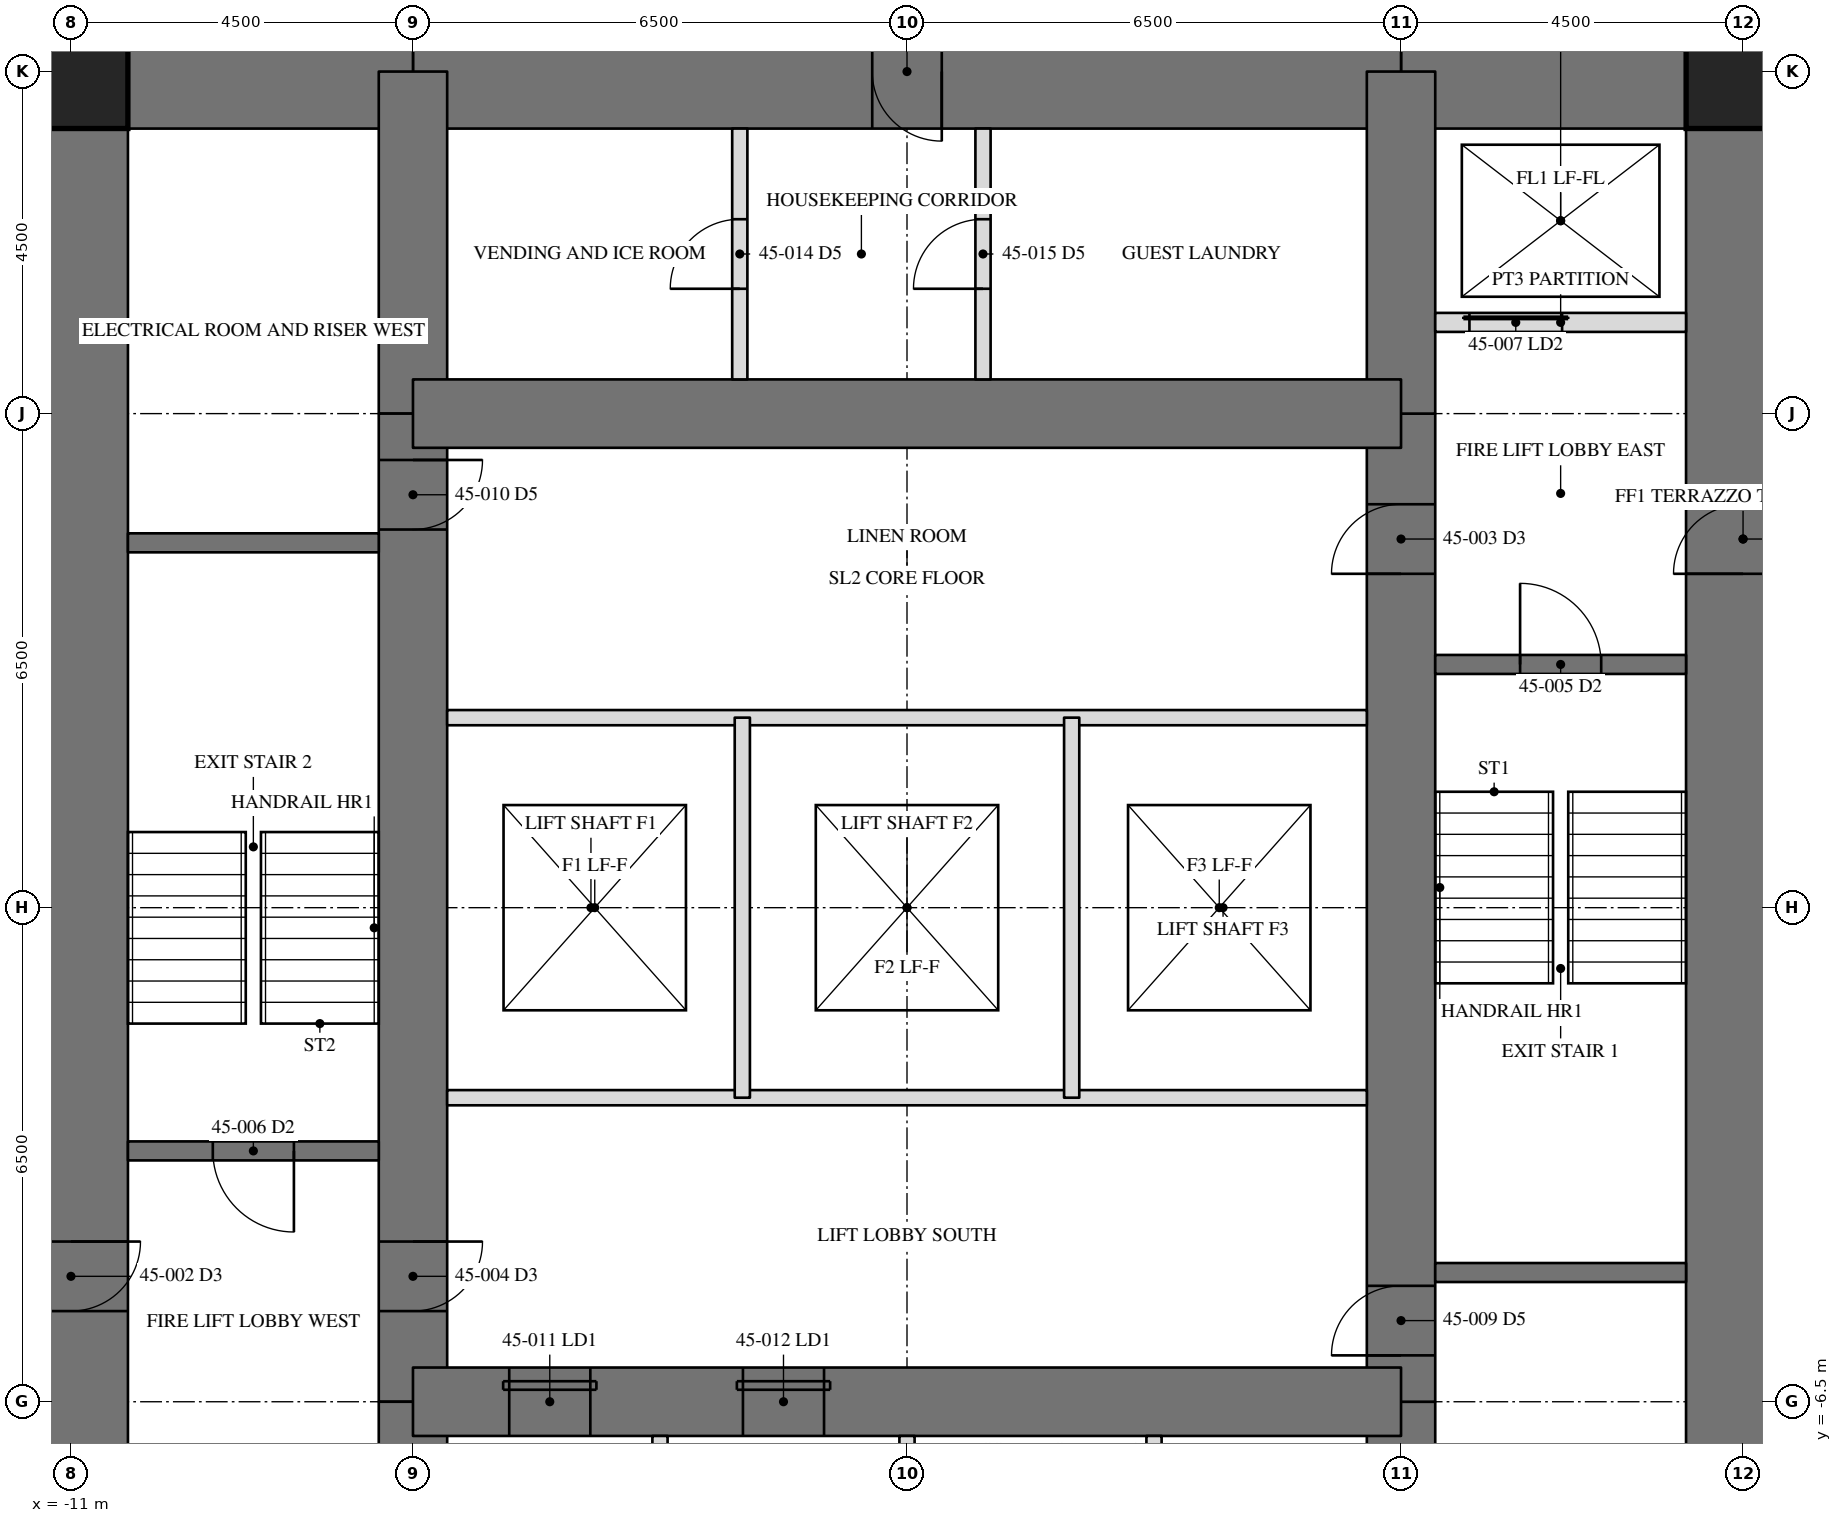
"""IFC4 building model, lengths in metres.
Left out: names, types, materials, properties, quantities, classifications, styles, units other than length and angle.
Written with IfcOpenShell. Run it as: python <this file> out.ifc"""

import sys

from ifc_helpers import new_model, si_unit, direction, frame, frame_2d, origin, origin_2d, place, context, subcontext, project, spatial, rectangle, hollow_rectangle, extrude, element, fill, save


model = new_model("IFC4")
c1 = context("Model", 3, precision=1e-05, world=origin(), true_north=direction((0.0, 1.0)))
c2 = subcontext(c1, "Body", "Model", "MODEL_VIEW")
j1 = project(units=[si_unit("LENGTHUNIT", "METRE"), si_unit("PLANEANGLEUNIT", "RADIAN")], contexts=[c1])
p1 = place(None, origin())
s1 = spatial("IfcSite", under=j1, at=p1, CompositionType="ELEMENT")
p2 = place(p1, origin())
s2 = spatial("IfcBuilding", under=s1, at=p2, CompositionType="ELEMENT")
p3 = place(p2, frame((0.0, 0.0, 194.2)))
s3 = spatial("IfcBuildingStorey", under=s2, at=p3, CompositionType="ELEMENT", Elevation=194.2)
p4 = place(p3, frame((11.0, -11.0, 0.0), z_axis=(0.0, 0.0, 1.0), x_axis=(0.0, 1.0, 0.0)))
e1 = element("IfcWall", 1, at=p4, inside=s3, PredefinedType="SHEAR", context=c2, shape_type="SweptSolid", body=[
    extrude(rectangle(XDim=22.0, YDim=1.5, at=frame_2d((11.0, 0.0))), origin(), (0.0, 0.0, 1.0), 3.5),
])
p5 = place(p4, frame((15.393, 0.0, 0.0)))
e2 = element("IfcOpeningElement", 2, at=p5, cuts=e1, PredefinedType="OPENING", context=c2, shape_type="SweptSolid", body=[
    extrude(rectangle(XDim=0.915, YDim=2.134, at=frame_2d((0.458, 1.067))), frame((0.0, 0.76, 0.0), z_axis=(0.0, -1.0, 0.0), x_axis=(1.0, 0.0, 0.0)), (0.0, 0.0, 1.0), 1.52),
])
p6 = place(p3, frame((-11.0, 11.0, 0.0), z_axis=(0.0, 0.0, 1.0), x_axis=(0.0, -1.0, 0.0)))
e3 = element("IfcWall", 3, at=p6, inside=s3, PredefinedType="SHEAR", context=c2, shape_type="SweptSolid", body=[
    extrude(rectangle(XDim=22.0, YDim=1.5, at=frame_2d((11.0, 0.0))), origin(), (0.0, 0.0, 1.0), 3.5),
])
p7 = place(p6, frame((15.393, 0.0, 0.0)))
e4 = element("IfcOpeningElement", 4, at=p7, cuts=e3, PredefinedType="OPENING", context=c2, shape_type="SweptSolid", body=[
    extrude(rectangle(XDim=0.915, YDim=2.134, at=frame_2d((0.458, 1.067))), frame((0.0, 0.76, 0.0), z_axis=(0.0, -1.0, 0.0), x_axis=(1.0, 0.0, 0.0)), (0.0, 0.0, 1.0), 1.52),
])
p8 = place(p3, frame((11.0, 11.0, 0.0), z_axis=(0.0, 0.0, 1.0), x_axis=(-1.0, 0.0, 0.0)))
e5 = element("IfcWall", 5, at=p8, inside=s3, PredefinedType="SHEAR", context=c2, shape_type="SweptSolid", body=[
    extrude(rectangle(XDim=4.5, YDim=1.5, at=frame_2d((2.25, 0.0))), origin(), (0.0, 0.0, 1.0), 3.5),
])
p9 = place(p3, frame((6.5, 11.0, 0.0), z_axis=(0.0, 0.0, 1.0), x_axis=(-1.0, 0.0, 0.0)))
e6 = element("IfcWall", 6, at=p9, inside=s3, PredefinedType="SHEAR", context=c2, shape_type="SweptSolid", body=[
    extrude(rectangle(XDim=13.0, YDim=1.5, at=frame_2d((6.5, 0.0))), origin(), (0.0, 0.0, 1.0), 3.5),
])
p10 = place(p9, frame((6.042, 0.0, 0.0)))
e7 = element("IfcOpeningElement", 7, at=p10, cuts=e6, PredefinedType="OPENING", context=c2, shape_type="SweptSolid", body=[
    extrude(rectangle(XDim=0.915, YDim=2.134, at=frame_2d((0.458, 1.067))), frame((0.0, 0.76, 0.0), z_axis=(0.0, -1.0, 0.0), x_axis=(1.0, 0.0, 0.0)), (0.0, 0.0, 1.0), 1.52),
])
p11 = place(p3, frame((-6.5, 11.0, 0.0), z_axis=(0.0, 0.0, 1.0), x_axis=(-1.0, 0.0, 0.0)))
e8 = element("IfcWall", 8, at=p11, inside=s3, PredefinedType="SHEAR", context=c2, shape_type="SweptSolid", body=[
    extrude(rectangle(XDim=4.5, YDim=1.5, at=frame_2d((2.25, 0.0))), origin(), (0.0, 0.0, 1.0), 3.5),
])
p12 = place(p3, frame((6.5, -11.0, 0.0), z_axis=(0.0, 0.0, 1.0), x_axis=(0.0, 1.0, 0.0)))
e9 = element("IfcWall", 9, at=p12, inside=s3, PredefinedType="SHEAR", context=c2, shape_type="SweptSolid", body=[
    extrude(rectangle(XDim=4.5, YDim=0.9, at=frame_2d((2.25, 0.0))), origin(), (0.0, 0.0, 1.0), 3.5),
])
p13 = place(p3, frame((6.5, -6.5, 0.0), z_axis=(0.0, 0.0, 1.0), x_axis=(0.0, 1.0, 0.0)))
e10 = element("IfcWall", 10, at=p13, inside=s3, PredefinedType="SHEAR", context=c2, shape_type="SweptSolid", body=[
    extrude(rectangle(XDim=13.0, YDim=0.9, at=frame_2d((6.5, 0.0))), origin(), (0.0, 0.0, 1.0), 3.5),
])
p14 = place(p13, frame((10.893, 0.0, 0.0)))
e11 = element("IfcOpeningElement", 11, at=p14, cuts=e10, PredefinedType="OPENING", context=c2, shape_type="SweptSolid", body=[
    extrude(rectangle(XDim=0.915, YDim=2.134, at=frame_2d((0.458, 1.067))), frame((0.0, 0.46, 0.0), z_axis=(0.0, -1.0, 0.0), x_axis=(1.0, 0.0, 0.0)), (0.0, 0.0, 1.0), 0.92),
])
p15 = place(p13, frame((0.61, 0.0, 0.0)))
e12 = element("IfcOpeningElement", 12, at=p15, cuts=e10, PredefinedType="OPENING", context=c2, shape_type="SweptSolid", body=[
    extrude(rectangle(XDim=0.915, YDim=2.134, at=frame_2d((0.458, 1.067))), frame((0.0, 0.46, 0.0), z_axis=(0.0, -1.0, 0.0), x_axis=(1.0, 0.0, 0.0)), (0.0, 0.0, 1.0), 0.92),
])
for number, where, z_axis, x_axis in (
    (13, (6.5, 6.5, 0.0), (0.0, 0.0, 1.0), (0.0, 1.0, 0.0)),
    (14, (-6.5, 11.0, 0.0), (0.0, 0.0, 1.0), (0.0, -1.0, 0.0)),
):
    element("IfcWall", number, at=place(p3, frame(where, z_axis=z_axis, x_axis=x_axis)), inside=s3, PredefinedType="SHEAR", context=c2, shape_type="SweptSolid", body=[
        extrude(rectangle(XDim=4.5, YDim=0.9, at=frame_2d((2.25, 0.0))), origin(), (0.0, 0.0, 1.0), 3.5),
    ])
p16 = place(p3, frame((-6.5, 6.5, 0.0), z_axis=(0.0, 0.0, 1.0), x_axis=(0.0, -1.0, 0.0)))
e15 = element("IfcWall", 15, at=p16, inside=s3, PredefinedType="SHEAR", context=c2, shape_type="SweptSolid", body=[
    extrude(rectangle(XDim=13.0, YDim=0.9, at=frame_2d((6.5, 0.0))), origin(), (0.0, 0.0, 1.0), 3.5),
])
p17 = place(p16, frame((10.893, 0.0, 0.0)))
e16 = element("IfcOpeningElement", 16, at=p17, cuts=e15, PredefinedType="OPENING", context=c2, shape_type="SweptSolid", body=[
    extrude(rectangle(XDim=0.915, YDim=2.134, at=frame_2d((0.458, 1.067))), frame((0.0, 0.46, 0.0), z_axis=(0.0, -1.0, 0.0), x_axis=(1.0, 0.0, 0.0)), (0.0, 0.0, 1.0), 0.92),
])
p18 = place(p16, frame((0.61, 0.0, 0.0)))
e17 = element("IfcOpeningElement", 17, at=p18, cuts=e15, PredefinedType="OPENING", context=c2, shape_type="SweptSolid", body=[
    extrude(rectangle(XDim=0.915, YDim=2.134, at=frame_2d((0.458, 1.067))), frame((0.0, 0.46, 0.0), z_axis=(0.0, -1.0, 0.0), x_axis=(1.0, 0.0, 0.0)), (0.0, 0.0, 1.0), 0.92),
])
p19 = place(p3, frame((-6.5, -6.5, 0.0), z_axis=(0.0, 0.0, 1.0), x_axis=(0.0, -1.0, 0.0)))
e18 = element("IfcWall", 18, at=p19, inside=s3, PredefinedType="SHEAR", context=c2, shape_type="SweptSolid", body=[
    extrude(rectangle(XDim=4.5, YDim=0.9, at=frame_2d((2.25, 0.0))), origin(), (0.0, 0.0, 1.0), 3.5),
])
p20 = place(p3, frame((6.5, 6.5, 0.0), z_axis=(0.0, 0.0, 1.0), x_axis=(-1.0, 0.0, 0.0)))
e19 = element("IfcWall", 19, at=p20, inside=s3, PredefinedType="SHEAR", context=c2, shape_type="SweptSolid", body=[
    extrude(rectangle(XDim=13.0, YDim=0.9, at=frame_2d((6.5, 0.0))), origin(), (0.0, 0.0, 1.0), 3.5),
])
p21 = place(p3, frame((-6.5, -6.5, 0.0), z_axis=(0.0, 0.0, 1.0), x_axis=(1.0, 0.0, 0.0)))
e20 = element("IfcWall", 20, at=p21, inside=s3, PredefinedType="SHEAR", context=c2, shape_type="SweptSolid", body=[
    extrude(rectangle(XDim=13.0, YDim=0.9, at=frame_2d((6.5, 0.0))), origin(), (0.0, 0.0, 1.0), 3.5),
])
p22 = place(p21, frame((1.267, 0.0, 0.0)))
e21 = element("IfcOpeningElement", 21, at=p22, cuts=e20, PredefinedType="OPENING", context=c2, shape_type="SweptSolid", body=[
    extrude(rectangle(XDim=1.067, YDim=2.134, at=frame_2d((0.533, 1.067))), frame((0.0, 0.46, 0.0), z_axis=(0.0, -1.0, 0.0), x_axis=(1.0, 0.0, 0.0)), (0.0, 0.0, 1.0), 0.92),
])
p23 = place(p21, frame((4.342, 0.0, 0.0)))
e22 = element("IfcOpeningElement", 22, at=p23, cuts=e20, PredefinedType="OPENING", context=c2, shape_type="SweptSolid", body=[
    extrude(rectangle(XDim=1.067, YDim=2.134, at=frame_2d((0.533, 1.067))), frame((0.0, 0.46, 0.0), z_axis=(0.0, -1.0, 0.0), x_axis=(1.0, 0.0, 0.0)), (0.0, 0.0, 1.0), 0.92),
])
for number, where, z_axis, x_axis in (
    (23, (11.0, 11.0, 0.0), (0.0, 0.0, 1.0), (1.0, 0.0, 0.0)),
    (24, (-11.0, 11.0, 0.0), (0.0, 0.0, 1.0), (1.0, 0.0, 0.0)),
):
    element("IfcColumn", number, at=place(p3, frame(where, z_axis=z_axis, x_axis=x_axis)), inside=s3, PredefinedType="COLUMN", context=c2, shape_type="SweptSolid", body=[
        extrude(hollow_rectangle(XDim=1.499, YDim=1.499, WallThickness=0.102, at=origin_2d()), origin(), (0.0, 0.0, 1.0), 3.5),
    ])
for number, where, z_axis, x_axis in (
    (25, (6.95, -4.8, 0.0), (0.0, 0.0, 1.0), (1.0, 0.0, 0.0)),
    (26, (-6.95, 4.8, 0.0), (0.0, 0.0, 1.0), (-1.0, 0.0, 0.0)),
):
    element("IfcWall", number, at=place(p3, frame(where, z_axis=z_axis, x_axis=x_axis)), inside=s3, PredefinedType="SOLIDWALL", context=c2, shape_type="SweptSolid", body=[
        extrude(rectangle(XDim=3.3, YDim=0.25, at=frame_2d((1.65, 0.0))), origin(), (0.0, 0.0, 1.0), 3.31),
    ])
p24 = place(p3, frame((6.95, 3.2, 0.0), z_axis=(0.0, 0.0, 1.0), x_axis=(1.0, 0.0, 0.0)))
e27 = element("IfcWall", 27, at=p24, inside=s3, PredefinedType="SOLIDWALL", context=c2, shape_type="SweptSolid", body=[
    extrude(rectangle(XDim=3.3, YDim=0.25, at=frame_2d((1.65, 0.0))), origin(), (0.0, 0.0, 1.0), 3.31),
])
p25 = place(p24, frame((1.116, 0.0, 0.0)))
e28 = element("IfcOpeningElement", 28, at=p25, cuts=e27, PredefinedType="OPENING", context=c2, shape_type="SweptSolid", body=[
    extrude(rectangle(XDim=1.067, YDim=2.134, at=frame_2d((0.533, 1.067))), frame((0.0, 0.135, 0.0), z_axis=(0.0, -1.0, 0.0), x_axis=(1.0, 0.0, 0.0)), (0.0, 0.0, 1.0), 0.27),
])
p26 = place(p3, frame((-6.95, -3.2, 0.0), z_axis=(0.0, 0.0, 1.0), x_axis=(-1.0, 0.0, 0.0)))
e29 = element("IfcWall", 29, at=p26, inside=s3, PredefinedType="SOLIDWALL", context=c2, shape_type="SweptSolid", body=[
    extrude(rectangle(XDim=3.3, YDim=0.25, at=frame_2d((1.65, 0.0))), origin(), (0.0, 0.0, 1.0), 3.31),
])
p27 = place(p26, frame((1.116, 0.0, 0.0)))
e30 = element("IfcOpeningElement", 30, at=p27, cuts=e29, PredefinedType="OPENING", context=c2, shape_type="SweptSolid", body=[
    extrude(rectangle(XDim=1.067, YDim=2.134, at=frame_2d((0.533, 1.067))), frame((0.0, 0.135, 0.0), z_axis=(0.0, -1.0, 0.0), x_axis=(1.0, 0.0, 0.0)), (0.0, 0.0, 1.0), 0.27),
])
p28 = place(p3, frame((6.95, 7.7, 0.0), z_axis=(0.0, 0.0, 1.0), x_axis=(1.0, 0.0, 0.0)))
e31 = element("IfcWall", 31, at=p28, inside=s3, PredefinedType="PARTITIONING", context=c2, shape_type="SweptSolid", body=[
    extrude(rectangle(XDim=3.3, YDim=0.25, at=frame_2d((1.65, 0.0))), origin(), (0.0, 0.0, 1.0), 3.31),
])
p29 = place(p28, frame((0.45, 0.0, 0.0)))
e32 = element("IfcOpeningElement", 32, at=p29, cuts=e31, PredefinedType="OPENING", context=c2, shape_type="SweptSolid", body=[
    extrude(rectangle(XDim=1.219, YDim=2.134, at=frame_2d((0.609, 1.067))), frame((0.0, 0.135, 0.0), z_axis=(0.0, -1.0, 0.0), x_axis=(1.0, 0.0, 0.0)), (0.0, 0.0, 1.0), 0.27),
])
for number, where, z_axis, x_axis in (
    (33, (-6.05, 2.5, 0.0), (0.0, 0.0, 1.0), (1.0, 0.0, 0.0)),
    (34, (6.05, -2.5, 0.0), (0.0, 0.0, 1.0), (-1.0, 0.0, 0.0)),
):
    element("IfcWall", number, at=place(p3, frame(where, z_axis=z_axis, x_axis=x_axis)), inside=s3, PredefinedType="PARTITIONING", context=c2, shape_type="SweptSolid", body=[
        extrude(rectangle(XDim=12.1, YDim=0.2, at=frame_2d((6.05, 0.0))), origin(), (0.0, 0.0, 1.0), 3.31),
    ])
for number, where, z_axis, x_axis in (
    (35, (-3.25, -10.25, 0.0), (0.0, 0.0, 1.0), (0.0, 1.0, 0.0)),
    (36, (0.0, -10.25, 0.0), (0.0, 0.0, 1.0), (0.0, 1.0, 0.0)),
    (37, (3.25, -10.25, 0.0), (0.0, 0.0, 1.0), (0.0, 1.0, 0.0)),
):
    element("IfcWall", number, at=place(p3, frame(where, z_axis=z_axis, x_axis=x_axis)), inside=s3, PredefinedType="PARTITIONING", context=c2, shape_type="SweptSolid", body=[
        extrude(rectangle(XDim=3.3, YDim=0.2, at=frame_2d((1.65, 0.0))), origin(), (0.0, 0.0, 1.0), 3.31),
    ])
for number, where, z_axis, x_axis in (
    (38, (-2.167, -2.5, 0.0), (0.0, 0.0, 1.0), (0.0, 1.0, 0.0)),
    (39, (2.167, -2.5, 0.0), (0.0, 0.0, 1.0), (0.0, 1.0, 0.0)),
):
    element("IfcWall", number, at=place(p3, frame(where, z_axis=z_axis, x_axis=x_axis)), inside=s3, PredefinedType="PARTITIONING", context=c2, shape_type="SweptSolid", body=[
        extrude(rectangle(XDim=5.0, YDim=0.2, at=frame_2d((2.5, 0.0))), origin(), (0.0, 0.0, 1.0), 3.31),
    ])
p30 = place(p3, frame((-2.2, 6.95, 0.0), z_axis=(0.0, 0.0, 1.0), x_axis=(0.0, 1.0, 0.0)))
e40 = element("IfcWall", 40, at=p30, inside=s3, PredefinedType="PARTITIONING", context=c2, shape_type="SweptSolid", body=[
    extrude(rectangle(XDim=3.3, YDim=0.2, at=frame_2d((1.65, 0.0))), origin(), (0.0, 0.0, 1.0), 3.31),
])
p31 = place(p30, frame((1.192, 0.0, 0.0)))
e41 = element("IfcOpeningElement", 41, at=p31, cuts=e40, PredefinedType="OPENING", context=c2, shape_type="SweptSolid", body=[
    extrude(rectangle(XDim=0.915, YDim=2.134, at=frame_2d((0.458, 1.067))), frame((0.0, 0.11, 0.0), z_axis=(0.0, -1.0, 0.0), x_axis=(1.0, 0.0, 0.0)), (0.0, 0.0, 1.0), 0.22),
])
p32 = place(p3, frame((1.0, 6.95, 0.0), z_axis=(0.0, 0.0, 1.0), x_axis=(0.0, 1.0, 0.0)))
e42 = element("IfcWall", 42, at=p32, inside=s3, PredefinedType="PARTITIONING", context=c2, shape_type="SweptSolid", body=[
    extrude(rectangle(XDim=3.3, YDim=0.2, at=frame_2d((1.65, 0.0))), origin(), (0.0, 0.0, 1.0), 3.31),
])
p33 = place(p32, frame((1.192, 0.0, 0.0)))
e43 = element("IfcOpeningElement", 43, at=p33, cuts=e42, PredefinedType="OPENING", context=c2, shape_type="SweptSolid", body=[
    extrude(rectangle(XDim=0.915, YDim=2.134, at=frame_2d((0.458, 1.067))), frame((0.0, 0.11, 0.0), z_axis=(0.0, -1.0, 0.0), x_axis=(1.0, 0.0, 0.0)), (0.0, 0.0, 1.0), 0.22),
])
p34 = place(p14, origin())
e44 = element("IfcDoor", 44, at=p34, inside=s3, OperationType="SINGLE_SWING_RIGHT", PredefinedType="DOOR", context=c2, shape_type="SweptSolid", body=[
    extrude(rectangle(XDim=0.915, YDim=2.134, at=frame_2d((0.458, 1.067))), frame((0.0, -0.375, 0.0), z_axis=(0.0, -1.0, 0.0), x_axis=(1.0, 0.0, 0.0)), (0.0, 0.0, 1.0), 0.05),
])
fill(e11, e44)
p35 = place(p17, origin())
e45 = element("IfcDoor", 45, at=p35, inside=s3, OperationType="SINGLE_SWING_RIGHT", PredefinedType="DOOR", context=c2, shape_type="SweptSolid", body=[
    extrude(rectangle(XDim=0.915, YDim=2.134, at=frame_2d((0.458, 1.067))), frame((0.0, -0.375, 0.0), z_axis=(0.0, -1.0, 0.0), x_axis=(1.0, 0.0, 0.0)), (0.0, 0.0, 1.0), 0.05),
])
fill(e16, e45)
p36 = place(p25, origin())
e46 = element("IfcDoor", 46, at=p36, inside=s3, OperationType="SINGLE_SWING_LEFT", PredefinedType="DOOR", context=c2, shape_type="SweptSolid", body=[
    extrude(rectangle(XDim=1.067, YDim=2.134, at=frame_2d((0.533, 1.067))), frame((0.0, 0.025, 0.0), z_axis=(0.0, -1.0, 0.0), x_axis=(1.0, 0.0, 0.0)), (0.0, 0.0, 1.0), 0.05),
])
fill(e28, e46)
p37 = place(p27, origin())
e47 = element("IfcDoor", 47, at=p37, inside=s3, OperationType="SINGLE_SWING_LEFT", PredefinedType="DOOR", context=c2, shape_type="SweptSolid", body=[
    extrude(rectangle(XDim=1.067, YDim=2.134, at=frame_2d((0.533, 1.067))), frame((0.0, 0.025, 0.0), z_axis=(0.0, -1.0, 0.0), x_axis=(1.0, 0.0, 0.0)), (0.0, 0.0, 1.0), 0.05),
])
fill(e30, e47)
p38 = place(p29, origin())
e48 = element("IfcDoor", 48, at=p38, inside=s3, OperationType="SLIDING_TO_LEFT", PredefinedType="DOOR", context=c2, shape_type="SweptSolid", body=[
    extrude(rectangle(XDim=1.219, YDim=2.134, at=frame_2d((0.609, 1.067))), frame((0.0, 0.025, 0.0), z_axis=(0.0, -1.0, 0.0), x_axis=(1.0, 0.0, 0.0)), (0.0, 0.0, 1.0), 0.05),
])
fill(e32, e48)
p39 = place(p15, origin())
e49 = element("IfcDoor", 49, at=p39, inside=s3, OperationType="SINGLE_SWING_RIGHT", PredefinedType="DOOR", context=c2, shape_type="SweptSolid", body=[
    extrude(rectangle(XDim=0.915, YDim=2.134, at=frame_2d((0.458, 1.067))), frame((0.0, -0.375, 0.0), z_axis=(0.0, -1.0, 0.0), x_axis=(1.0, 0.0, 0.0)), (0.0, 0.0, 1.0), 0.05),
])
fill(e12, e49)
p40 = place(p18, origin())
e50 = element("IfcDoor", 50, at=p40, inside=s3, OperationType="SINGLE_SWING_RIGHT", PredefinedType="DOOR", context=c2, shape_type="SweptSolid", body=[
    extrude(rectangle(XDim=0.915, YDim=2.134, at=frame_2d((0.458, 1.067))), frame((0.0, -0.375, 0.0), z_axis=(0.0, -1.0, 0.0), x_axis=(1.0, 0.0, 0.0)), (0.0, 0.0, 1.0), 0.05),
])
fill(e17, e50)
p41 = place(p22, origin())
e51 = element("IfcDoor", 51, at=p41, inside=s3, OperationType="SLIDING_TO_LEFT", PredefinedType="DOOR", context=c2, shape_type="SweptSolid", body=[
    extrude(rectangle(XDim=1.067, YDim=2.134, at=frame_2d((0.533, 1.067))), frame((0.0, -0.375, 0.0), z_axis=(0.0, -1.0, 0.0), x_axis=(1.0, 0.0, 0.0)), (0.0, 0.0, 1.0), 0.05),
])
fill(e21, e51)
p42 = place(p23, origin())
e52 = element("IfcDoor", 52, at=p42, inside=s3, OperationType="SLIDING_TO_LEFT", PredefinedType="DOOR", context=c2, shape_type="SweptSolid", body=[
    extrude(rectangle(XDim=1.067, YDim=2.134, at=frame_2d((0.533, 1.067))), frame((0.0, -0.375, 0.0), z_axis=(0.0, -1.0, 0.0), x_axis=(1.0, 0.0, 0.0)), (0.0, 0.0, 1.0), 0.05),
])
fill(e22, e52)
p43 = place(p10, origin())
e53 = element("IfcDoor", 53, at=p43, inside=s3, OperationType="SINGLE_SWING_RIGHT", PredefinedType="DOOR", context=c2, shape_type="SweptSolid", body=[
    extrude(rectangle(XDim=0.915, YDim=2.134, at=frame_2d((0.458, 1.067))), frame((0.0, 0.025, 0.0), z_axis=(0.0, -1.0, 0.0), x_axis=(1.0, 0.0, 0.0)), (0.0, 0.0, 1.0), 0.05),
])
fill(e7, e53)
p44 = place(p31, origin())
e54 = element("IfcDoor", 54, at=p44, inside=s3, OperationType="SINGLE_SWING_RIGHT", PredefinedType="DOOR", context=c2, shape_type="SweptSolid", body=[
    extrude(rectangle(XDim=0.915, YDim=2.134, at=frame_2d((0.458, 1.067))), frame((0.0, 0.025, 0.0), z_axis=(0.0, -1.0, 0.0), x_axis=(1.0, 0.0, 0.0)), (0.0, 0.0, 1.0), 0.05),
])
fill(e41, e54)
p45 = place(p33, origin())
e55 = element("IfcDoor", 55, at=p45, inside=s3, OperationType="SINGLE_SWING_RIGHT", PredefinedType="DOOR", context=c2, shape_type="SweptSolid", body=[
    extrude(rectangle(XDim=0.915, YDim=2.134, at=frame_2d((0.458, 1.067))), frame((0.0, 0.025, 0.0), z_axis=(0.0, -1.0, 0.0), x_axis=(1.0, 0.0, 0.0)), (0.0, 0.0, 1.0), 0.05),
])
fill(e43, e55)
save(model, sys.argv[1])
